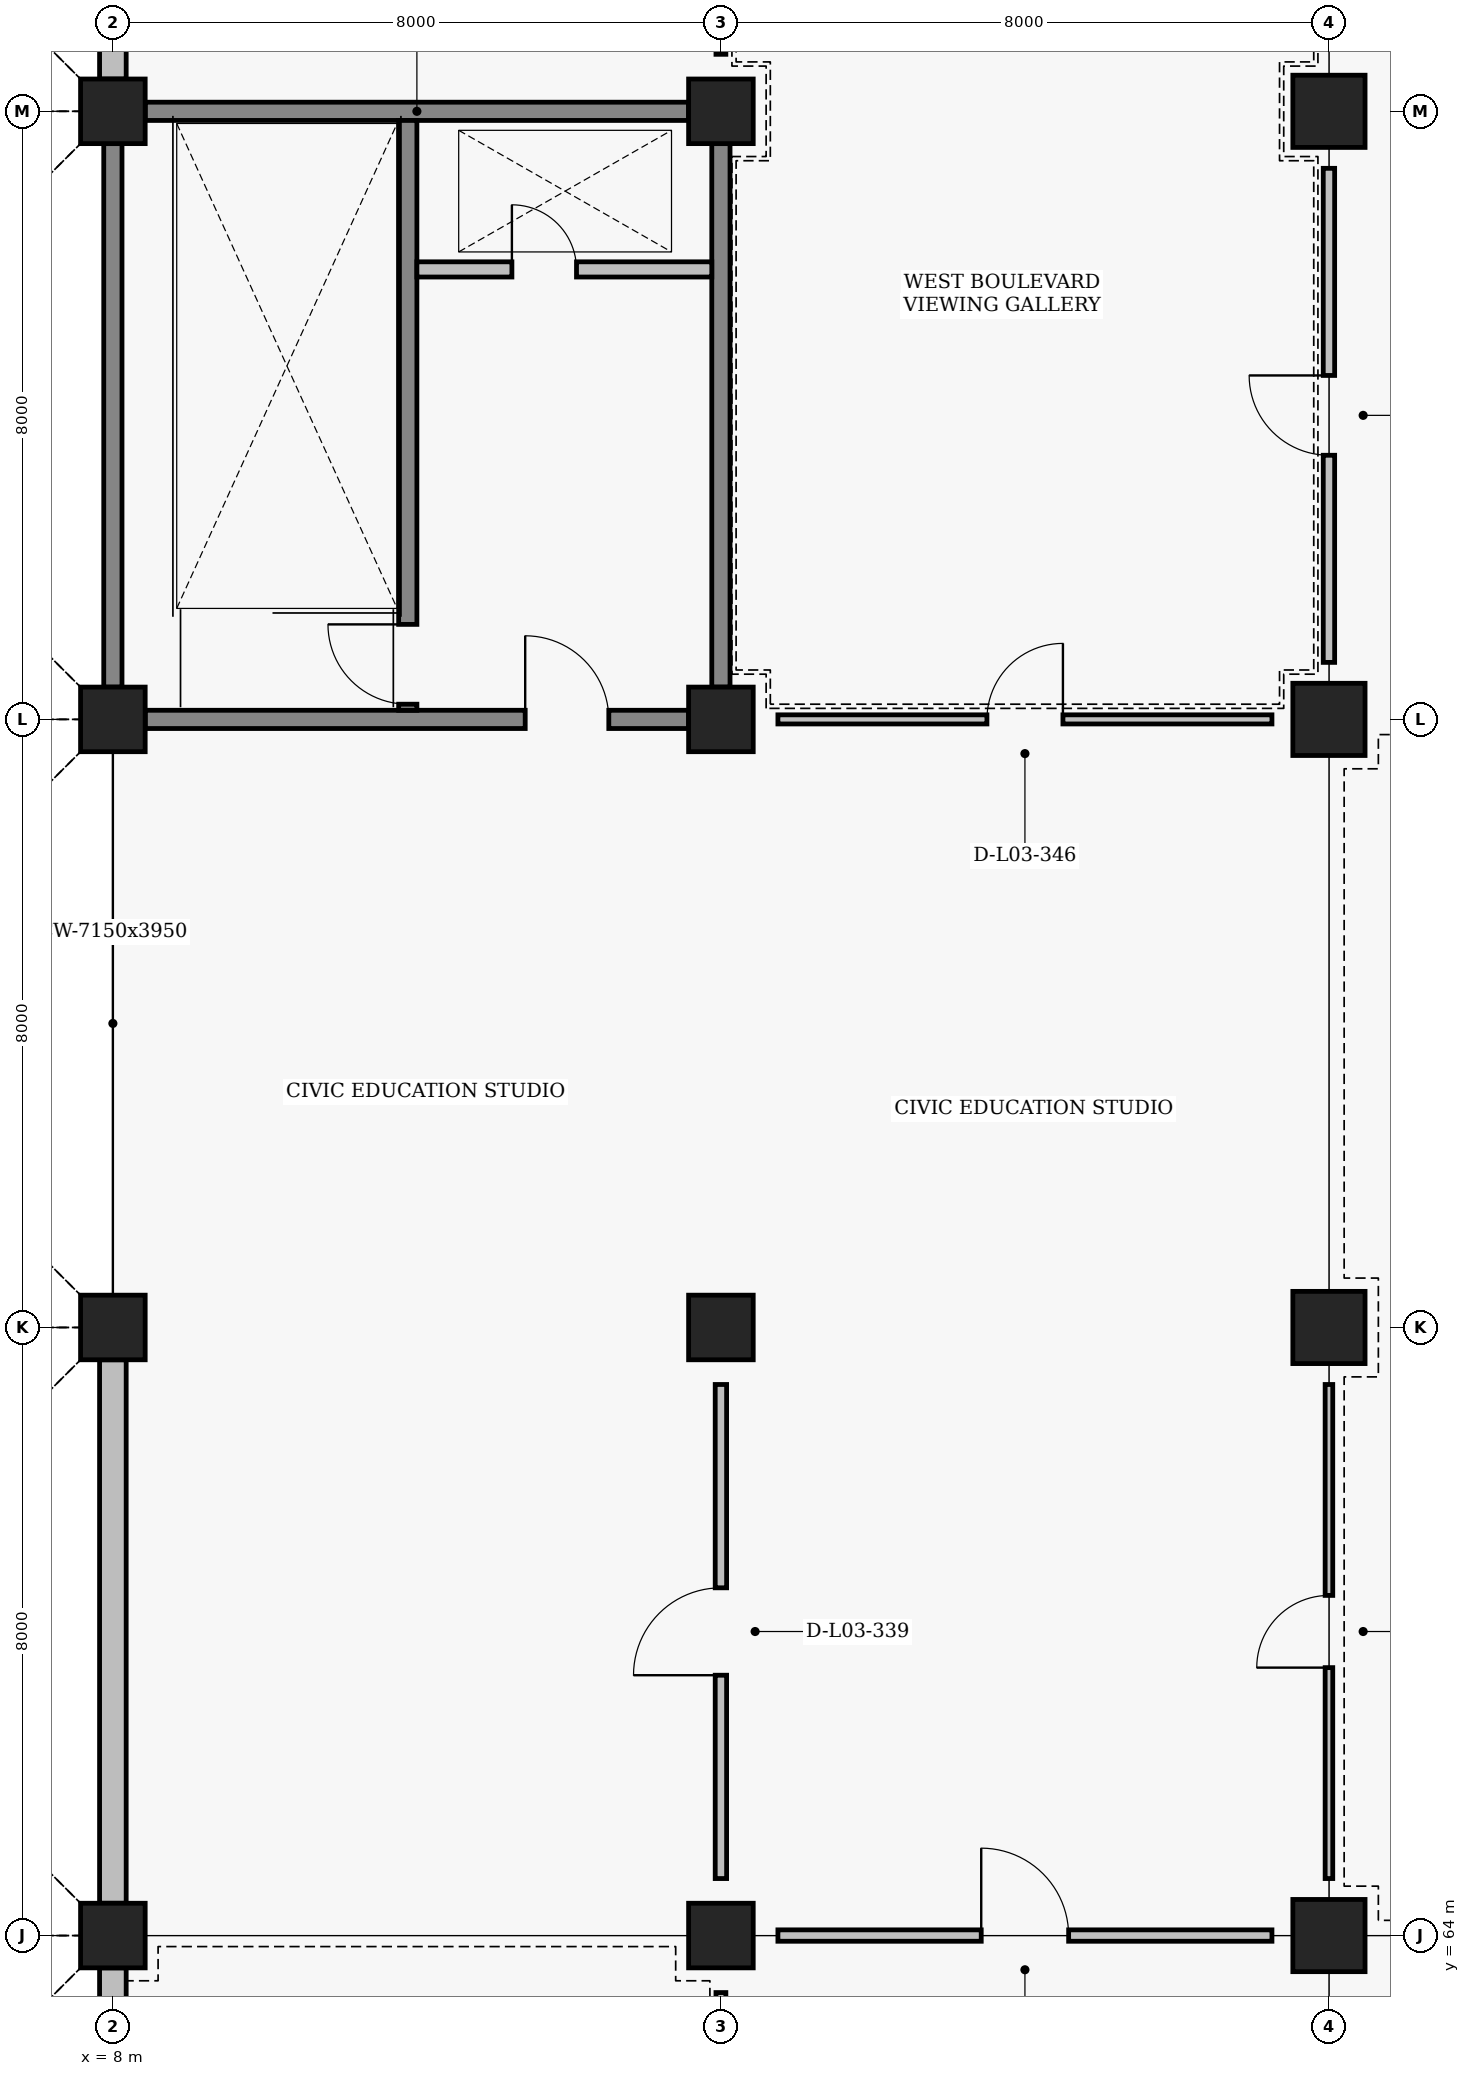
"""IFC4 building model, lengths in metres.
Left out: names, types, materials, properties, quantities, classifications, styles, units other than length and angle.
Written with IfcOpenShell. Run it as: python <this file> out.ifc"""

import sys

from ifc_helpers import new_model, si_unit, direction, frame, frame_2d, origin, origin_2d, place, context, subcontext, project, spatial, rectangle, circle, extrude, element, fill, save


model = new_model("IFC4")
c1 = context("Model", 3, precision=1e-05, world=origin(), true_north=direction((0.0, 1.0)))
c2 = subcontext(c1, "Body", "Model", "MODEL_VIEW")
j1 = project(units=[si_unit("LENGTHUNIT", "METRE"), si_unit("PLANEANGLEUNIT", "RADIAN")], contexts=[c1])
p1 = place(None, origin())
s1 = spatial("IfcSite", under=j1, at=p1, CompositionType="ELEMENT")
p2 = place(p1, origin())
s2 = spatial("IfcBuilding", under=s1, at=p2, CompositionType="ELEMENT")
p3 = place(p2, frame((0.0, 0.0, 9.6)))
s3 = spatial("IfcBuildingStorey", under=s2, at=p3, CompositionType="ELEMENT", Elevation=9.6)
for number, where, z_axis, x_axis in (
    (1, (8.0, 64.0, 0.0), (0.0, 0.0, 1.0), (1.0, 0.0, 0.0)),
    (2, (8.0, 72.0, 0.0), (0.0, 0.0, 1.0), (1.0, 0.0, 0.0)),
    (3, (8.0, 80.0, 0.0), (0.0, 0.0, 1.0), (1.0, 0.0, 0.0)),
    (4, (8.0, 88.0, 0.0), (0.0, 0.0, 1.0), (1.0, 0.0, 0.0)),
    (5, (16.0, 64.0, 0.0), (0.0, 0.0, 1.0), (1.0, 0.0, 0.0)),
    (6, (16.0, 72.0, 0.0), (0.0, 0.0, 1.0), (1.0, 0.0, 0.0)),
    (7, (16.0, 80.0, 0.0), (0.0, 0.0, 1.0), (1.0, 0.0, 0.0)),
    (8, (16.0, 88.0, 0.0), (0.0, 0.0, 1.0), (1.0, 0.0, 0.0)),
):
    element("IfcColumn", number, at=place(p3, frame(where, z_axis=z_axis, x_axis=x_axis)), inside=s3, PredefinedType="COLUMN", context=c2, shape_type="SweptSolid", body=[
        extrude(circle(Radius=0.425, at=origin_2d()), origin(), (0.0, 0.0, 1.0), 4.8),
    ])
for number, where, z_axis, x_axis in (
    (9, (24.0, 64.0, 0.0), (0.0, 0.0, 1.0), (1.0, 0.0, 0.0)),
    (10, (24.0, 72.0, 0.0), (0.0, 0.0, 1.0), (1.0, 0.0, 0.0)),
    (11, (24.0, 80.0, 0.0), (0.0, 0.0, 1.0), (1.0, 0.0, 0.0)),
    (12, (24.0, 88.0, 0.0), (0.0, 0.0, 1.0), (1.0, 0.0, 0.0)),
):
    element("IfcColumn", number, at=place(p3, frame(where, z_axis=z_axis, x_axis=x_axis)), inside=s3, PredefinedType="COLUMN", context=c2, shape_type="SweptSolid", body=[
        extrude(rectangle(XDim=0.95, YDim=0.95, at=origin_2d()), origin(), (0.0, 0.0, 1.0), 4.8),
    ])
p4 = place(p3, frame((8.0, 56.425, 0.0), z_axis=(0.0, 0.0, 1.0), x_axis=(0.0, 1.0, 0.0)))
e13 = element("IfcWall", 13, at=p4, inside=s3, PredefinedType="SOLIDWALL", context=c2, shape_type="SweptSolid", body=[
    extrude(rectangle(XDim=7.15, YDim=0.35, at=frame_2d((3.575, 0.0))), origin(), (0.0, 0.0, 1.0), 3.72),
])
p5 = place(p4, frame((2.175, 0.0, 1.9)))
e14 = element("IfcOpeningElement", 14, at=p5, cuts=e13, PredefinedType="OPENING", context=c2, shape_type="SweptSolid", body=[
    extrude(rectangle(XDim=2.8, YDim=1.1, at=frame_2d((1.4, 0.55))), frame((0.0, 0.185, 0.0), z_axis=(0.0, -1.0, 0.0), x_axis=(1.0, 0.0, 0.0)), (0.0, 0.0, 1.0), 0.37),
])
p6 = place(p3, frame((8.0, 64.425, 0.0), z_axis=(0.0, 0.0, 1.0), x_axis=(0.0, 1.0, 0.0)))
e15 = element("IfcWall", 15, at=p6, inside=s3, PredefinedType="SOLIDWALL", context=c2, shape_type="SweptSolid", body=[
    extrude(rectangle(XDim=7.15, YDim=0.35, at=frame_2d((3.575, 0.0))), origin(), (0.0, 0.0, 1.0), 3.95),
])
p7 = place(p3, frame((8.0, 88.425, 0.0), z_axis=(0.0, 0.0, 1.0), x_axis=(0.0, 1.0, 0.0)))
e16 = element("IfcWall", 16, at=p7, inside=s3, PredefinedType="SOLIDWALL", context=c2, shape_type="SweptSolid", body=[
    extrude(rectangle(XDim=7.15, YDim=0.35, at=frame_2d((3.575, 0.0))), origin(), (0.0, 0.0, 1.0), 3.95),
])
p8 = place(p7, frame((1.975, 0.0, 1.9)))
e17 = element("IfcOpeningElement", 17, at=p8, cuts=e16, PredefinedType="OPENING", context=c2, shape_type="SweptSolid", body=[
    extrude(rectangle(XDim=3.2, YDim=1.1, at=frame_2d((1.6, 0.55))), frame((0.0, 0.185, 0.0), z_axis=(0.0, -1.0, 0.0), x_axis=(1.0, 0.0, 0.0)), (0.0, 0.0, 1.0), 0.37),
])
p9 = place(p3, frame((8.425, 80.0, 0.0), z_axis=(0.0, 0.0, 1.0), x_axis=(1.0, 0.0, 0.0)))
e18 = element("IfcWall", 18, at=p9, inside=s3, PredefinedType="SHEAR", context=c2, shape_type="SweptSolid", body=[
    extrude(rectangle(XDim=7.15, YDim=0.24, at=frame_2d((3.575, 0.0))), origin(), (0.0, 0.0, 1.0), 3.97),
])
p10 = place(p9, frame((5.0, 0.0, 0.0)))
e19 = element("IfcOpeningElement", 19, at=p10, cuts=e18, PredefinedType="OPENING", context=c2, shape_type="SweptSolid", body=[
    extrude(rectangle(XDim=1.1, YDim=2.2, at=frame_2d((0.55, 1.1))), frame((0.0, 0.13, 0.0), z_axis=(0.0, -1.0, 0.0), x_axis=(1.0, 0.0, 0.0)), (0.0, 0.0, 1.0), 0.26),
])
for number, where, z_axis, x_axis in (
    (20, (8.425, 88.0, 0.0), (0.0, 0.0, 1.0), (1.0, 0.0, 0.0)),
    (21, (8.0, 80.425, 0.0), (0.0, 0.0, 1.0), (0.0, 1.0, 0.0)),
    (22, (16.0, 80.425, 0.0), (0.0, 0.0, 1.0), (0.0, 1.0, 0.0)),
):
    element("IfcWall", number, at=place(p3, frame(where, z_axis=z_axis, x_axis=x_axis)), inside=s3, PredefinedType="SHEAR", context=c2, shape_type="SweptSolid", body=[
        extrude(rectangle(XDim=7.15, YDim=0.24, at=frame_2d((3.575, 0.0))), origin(), (0.0, 0.0, 1.0), 3.97),
    ])
p11 = place(p3, frame((11.88, 80.12, 0.0), z_axis=(0.0, 0.0, 1.0), x_axis=(0.0, 1.0, 0.0)))
e23 = element("IfcWall", 23, at=p11, inside=s3, PredefinedType="SHEAR", context=c2, shape_type="SweptSolid", body=[
    extrude(rectangle(XDim=7.76, YDim=0.24, at=frame_2d((3.88, 0.0))), origin(), (0.0, 0.0, 1.0), 4.07),
])
p12 = place(p11, frame((0.08, 0.0, 0.0)))
e24 = element("IfcOpeningElement", 24, at=p12, cuts=e23, PredefinedType="OPENING", context=c2, shape_type="SweptSolid", body=[
    extrude(rectangle(XDim=1.05, YDim=2.15, at=frame_2d((0.525, 1.075))), frame((0.0, 0.13, 0.0), z_axis=(0.0, -1.0, 0.0), x_axis=(1.0, 0.0, 0.0)), (0.0, 0.0, 1.0), 0.26),
])
p13 = place(p3, frame((12.0, 85.92, 0.0), z_axis=(0.0, 0.0, 1.0), x_axis=(1.0, 0.0, 0.0)))
e25 = element("IfcWall", 25, at=p13, inside=s3, PredefinedType="PARTITIONING", context=c2, shape_type="SweptSolid", body=[
    extrude(rectangle(XDim=3.88, YDim=0.2, at=frame_2d((1.94, 0.0))), origin(), (0.0, 0.0, 1.0), 3.97),
])
p14 = place(p13, frame((1.25, 0.0, 0.0)))
e26 = element("IfcOpeningElement", 26, at=p14, cuts=e25, PredefinedType="OPENING", context=c2, shape_type="SweptSolid", body=[
    extrude(rectangle(XDim=0.85, YDim=2.05, at=frame_2d((0.425, 1.025))), frame((0.0, 0.11, 0.0), z_axis=(0.0, -1.0, 0.0), x_axis=(1.0, 0.0, 0.0)), (0.0, 0.0, 1.0), 0.22),
])
p15 = place(p3, frame((24.0, 64.75, 0.0), z_axis=(0.0, 0.0, 1.0), x_axis=(0.0, 1.0, 0.0)))
e27 = element("IfcWall", 27, at=p15, inside=s3, PredefinedType="PARTITIONING", context=c2, shape_type="SweptSolid", body=[
    extrude(rectangle(XDim=6.5, YDim=0.1, at=frame_2d((3.25, 0.0))), origin(), (0.0, 0.0, 1.0), 3.93),
])
p16 = place(p15, frame((2.775, 0.0, 0.0)))
e28 = element("IfcOpeningElement", 28, at=p16, cuts=e27, PredefinedType="OPENING", context=c2, shape_type="SweptSolid", body=[
    extrude(rectangle(XDim=0.95, YDim=2.1, at=frame_2d((0.475, 1.05))), frame((0.0, 0.06, 0.0), z_axis=(0.0, -1.0, 0.0), x_axis=(1.0, 0.0, 0.0)), (0.0, 0.0, 1.0), 0.12),
])
p17 = place(p3, frame((24.0, 80.75, 0.0), z_axis=(0.0, 0.0, 1.0), x_axis=(0.0, 1.0, 0.0)))
e29 = element("IfcWall", 29, at=p17, inside=s3, PredefinedType="PARTITIONING", context=c2, shape_type="SweptSolid", body=[
    extrude(rectangle(XDim=6.5, YDim=0.15, at=frame_2d((3.25, 0.0))), origin(), (0.0, 0.0, 1.0), 3.93),
])
p18 = place(p17, frame((2.725, 0.0, 0.0)))
e30 = element("IfcOpeningElement", 30, at=p18, cuts=e29, PredefinedType="OPENING", context=c2, shape_type="SweptSolid", body=[
    extrude(rectangle(XDim=1.05, YDim=2.15, at=frame_2d((0.525, 1.075))), frame((0.0, 0.085, 0.0), z_axis=(0.0, -1.0, 0.0), x_axis=(1.0, 0.0, 0.0)), (0.0, 0.0, 1.0), 0.17),
])
p19 = place(p3, frame((16.0, 64.75, 0.0), z_axis=(0.0, 0.0, 1.0), x_axis=(0.0, 1.0, 0.0)))
e31 = element("IfcWall", 31, at=p19, inside=s3, PredefinedType="PARTITIONING", context=c2, shape_type="SweptSolid", body=[
    extrude(rectangle(XDim=6.5, YDim=0.15, at=frame_2d((3.25, 0.0))), origin(), (0.0, 0.0, 1.0), 3.97),
])
p20 = place(p19, frame((2.675, 0.0, 0.0)))
e32 = element("IfcOpeningElement", 32, at=p20, cuts=e31, PredefinedType="OPENING", context=c2, shape_type="SweptSolid", body=[
    extrude(rectangle(XDim=1.15, YDim=2.15, at=frame_2d((0.575, 1.075))), frame((0.0, 0.085, 0.0), z_axis=(0.0, -1.0, 0.0), x_axis=(1.0, 0.0, 0.0)), (0.0, 0.0, 1.0), 0.17),
])
p21 = place(p3, frame((16.0, 88.75, 0.0), z_axis=(0.0, 0.0, 1.0), x_axis=(0.0, 1.0, 0.0)))
e33 = element("IfcWall", 33, at=p21, inside=s3, PredefinedType="PARTITIONING", context=c2, shape_type="SweptSolid", body=[
    extrude(rectangle(XDim=6.5, YDim=0.13, at=frame_2d((3.25, 0.0))), origin(), (0.0, 0.0, 1.0), 3.97),
])
p22 = place(p21, frame((2.75, 0.0, 0.0)))
e34 = element("IfcOpeningElement", 34, at=p22, cuts=e33, PredefinedType="OPENING", context=c2, shape_type="SweptSolid", body=[
    extrude(rectangle(XDim=1.0, YDim=2.1, at=frame_2d((0.5, 1.05))), frame((0.0, 0.075, 0.0), z_axis=(0.0, -1.0, 0.0), x_axis=(1.0, 0.0, 0.0)), (0.0, 0.0, 1.0), 0.15),
])
p23 = place(p3, frame((16.0, 56.75, 0.0), z_axis=(0.0, 0.0, 1.0), x_axis=(0.0, 1.0, 0.0)))
e35 = element("IfcWall", 35, at=p23, inside=s3, PredefinedType="PARTITIONING", context=c2, shape_type="SweptSolid", body=[
    extrude(rectangle(XDim=6.5, YDim=0.13, at=frame_2d((3.25, 0.0))), origin(), (0.0, 0.0, 1.0), 3.97),
])
p24 = place(p23, frame((2.75, 0.0, 0.0)))
e36 = element("IfcOpeningElement", 36, at=p24, cuts=e35, PredefinedType="OPENING", context=c2, shape_type="SweptSolid", body=[
    extrude(rectangle(XDim=1.0, YDim=2.1, at=frame_2d((0.5, 1.05))), frame((0.0, 0.075, 0.0), z_axis=(0.0, -1.0, 0.0), x_axis=(1.0, 0.0, 0.0)), (0.0, 0.0, 1.0), 0.15),
])
p25 = place(p3, frame((16.75, 64.0, 0.0), z_axis=(0.0, 0.0, 1.0), x_axis=(1.0, 0.0, 0.0)))
e37 = element("IfcWall", 37, at=p25, inside=s3, PredefinedType="PARTITIONING", context=c2, shape_type="SweptSolid", body=[
    extrude(rectangle(XDim=6.5, YDim=0.15, at=frame_2d((3.25, 0.0))), origin(), (0.0, 0.0, 1.0), 3.97),
])
p26 = place(p25, frame((2.675, 0.0, 0.0)))
e38 = element("IfcOpeningElement", 38, at=p26, cuts=e37, PredefinedType="OPENING", context=c2, shape_type="SweptSolid", body=[
    extrude(rectangle(XDim=1.15, YDim=2.15, at=frame_2d((0.575, 1.075))), frame((0.0, 0.085, 0.0), z_axis=(0.0, -1.0, 0.0), x_axis=(1.0, 0.0, 0.0)), (0.0, 0.0, 1.0), 0.17),
])
p27 = place(p3, frame((16.75, 80.0, 0.0), z_axis=(0.0, 0.0, 1.0), x_axis=(1.0, 0.0, 0.0)))
e39 = element("IfcWall", 39, at=p27, inside=s3, PredefinedType="PARTITIONING", context=c2, shape_type="SweptSolid", body=[
    extrude(rectangle(XDim=6.5, YDim=0.12, at=frame_2d((3.25, 0.0))), origin(), (0.0, 0.0, 1.0), 3.97),
])
p28 = place(p27, frame((2.75, 0.0, 0.0)))
e40 = element("IfcOpeningElement", 40, at=p28, cuts=e39, PredefinedType="OPENING", context=c2, shape_type="SweptSolid", body=[
    extrude(rectangle(XDim=1.0, YDim=2.1, at=frame_2d((0.5, 1.05))), frame((0.0, 0.07, 0.0), z_axis=(0.0, -1.0, 0.0), x_axis=(1.0, 0.0, 0.0)), (0.0, 0.0, 1.0), 0.14),
])
p29 = place(p10, origin())
e41 = element("IfcDoor", 41, at=p29, inside=s3, OperationType="SINGLE_SWING_LEFT", PredefinedType="DOOR", context=c2, shape_type="SweptSolid", body=[
    extrude(rectangle(XDim=1.1, YDim=2.2, at=frame_2d((0.55, 1.1))), frame((0.0, 0.025, 0.0), z_axis=(0.0, -1.0, 0.0), x_axis=(1.0, 0.0, 0.0)), (0.0, 0.0, 1.0), 0.05),
])
fill(e19, e41)
p30 = place(p12, origin())
e42 = element("IfcDoor", 42, at=p30, inside=s3, OperationType="SINGLE_SWING_RIGHT", PredefinedType="DOOR", context=c2, shape_type="SweptSolid", body=[
    extrude(rectangle(XDim=1.05, YDim=2.15, at=frame_2d((0.525, 1.075))), frame((0.0, 0.025, 0.0), z_axis=(0.0, -1.0, 0.0), x_axis=(1.0, 0.0, 0.0)), (0.0, 0.0, 1.0), 0.05),
])
fill(e24, e42)
p31 = place(p14, origin())
e43 = element("IfcDoor", 43, at=p31, inside=s3, OperationType="SINGLE_SWING_LEFT", PredefinedType="TRAPDOOR", context=c2, shape_type="SweptSolid", body=[
    extrude(rectangle(XDim=0.85, YDim=2.05, at=frame_2d((0.425, 1.025))), frame((0.0, 0.025, 0.0), z_axis=(0.0, -1.0, 0.0), x_axis=(1.0, 0.0, 0.0)), (0.0, 0.0, 1.0), 0.05),
])
fill(e26, e43)
p32 = place(p16, origin())
e44 = element("IfcDoor", 44, at=p32, inside=s3, OperationType="SINGLE_SWING_LEFT", PredefinedType="DOOR", context=c2, shape_type="SweptSolid", body=[
    extrude(rectangle(XDim=0.95, YDim=2.1, at=frame_2d((0.475, 1.05))), frame((0.0, 0.025, 0.0), z_axis=(0.0, -1.0, 0.0), x_axis=(1.0, 0.0, 0.0)), (0.0, 0.0, 1.0), 0.05),
])
fill(e28, e44)
p33 = place(p18, origin())
e45 = element("IfcDoor", 45, at=p33, inside=s3, OperationType="SINGLE_SWING_RIGHT", PredefinedType="DOOR", context=c2, shape_type="SweptSolid", body=[
    extrude(rectangle(XDim=1.05, YDim=2.15, at=frame_2d((0.525, 1.075))), frame((0.0, 0.025, 0.0), z_axis=(0.0, -1.0, 0.0), x_axis=(1.0, 0.0, 0.0)), (0.0, 0.0, 1.0), 0.05),
])
fill(e30, e45)
p34 = place(p20, origin())
e46 = element("IfcDoor", 46, at=p34, inside=s3, OperationType="SINGLE_SWING_LEFT", PredefinedType="DOOR", context=c2, shape_type="SweptSolid", body=[
    extrude(rectangle(XDim=1.15, YDim=2.15, at=frame_2d((0.575, 1.075))), frame((0.0, 0.025, 0.0), z_axis=(0.0, -1.0, 0.0), x_axis=(1.0, 0.0, 0.0)), (0.0, 0.0, 1.0), 0.05),
])
fill(e32, e46)
p35 = place(p26, origin())
e47 = element("IfcDoor", 47, at=p35, inside=s3, OperationType="SINGLE_SWING_LEFT", PredefinedType="DOOR", context=c2, shape_type="SweptSolid", body=[
    extrude(rectangle(XDim=1.15, YDim=2.15, at=frame_2d((0.575, 1.075))), frame((0.0, 0.025, 0.0), z_axis=(0.0, -1.0, 0.0), x_axis=(1.0, 0.0, 0.0)), (0.0, 0.0, 1.0), 0.05),
])
fill(e38, e47)
p36 = place(p28, origin())
e48 = element("IfcDoor", 48, at=p36, inside=s3, OperationType="SINGLE_SWING_RIGHT", PredefinedType="DOOR", context=c2, shape_type="SweptSolid", body=[
    extrude(rectangle(XDim=1.0, YDim=2.1, at=frame_2d((0.5, 1.05))), frame((0.0, 0.025, 0.0), z_axis=(0.0, -1.0, 0.0), x_axis=(1.0, 0.0, 0.0)), (0.0, 0.0, 1.0), 0.05),
])
fill(e40, e48)
save(model, sys.argv[1])
